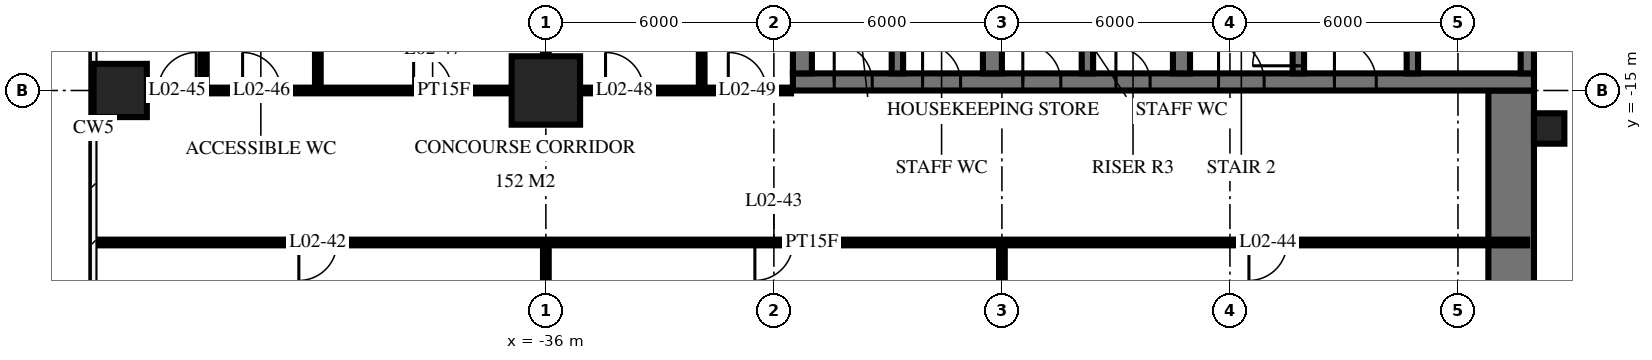
"""IFC4 building model, lengths in metres.
Left out: names, types, materials, properties, quantities, classifications, styles, units other than length and angle.
Written with IfcOpenShell. Run it as: python <this file> out.ifc"""

import sys

from ifc_helpers import new_model, si_unit, direction, frame, frame_2d, origin, origin_2d, place, context, subcontext, project, spatial, rectangle, circle, extrude, element, fill, save


model = new_model("IFC4")
c1 = context("Model", 3, precision=1e-05, world=origin(), true_north=direction((0.0, 1.0)))
c2 = subcontext(c1, "Body", "Model", "MODEL_VIEW")
j1 = project(units=[si_unit("LENGTHUNIT", "METRE"), si_unit("PLANEANGLEUNIT", "RADIAN")], contexts=[c1])
p1 = place(None, origin())
s1 = spatial("IfcSite", under=j1, at=p1, CompositionType="ELEMENT")
p2 = place(p1, origin())
s2 = spatial("IfcBuilding", under=s1, at=p2, CompositionType="ELEMENT")
p3 = place(p2, frame((0.0, 0.0, 12.5)))
s3 = spatial("IfcBuildingStorey", under=s2, at=p3, CompositionType="ELEMENT", Elevation=12.5)
p4 = place(p3, frame((-47.2, -15.0, 0.0), z_axis=(0.0, 0.0, 1.0), x_axis=(1.0, 0.0, 0.0)))
e1 = element("IfcColumn", 1, at=p4, inside=s3, PredefinedType="COLUMN", context=c2, shape_type="SweptSolid", body=[
    extrude(circle(Radius=0.7, at=origin_2d()), origin(), (0.0, 0.0, 1.0), 5.5),
])
p5 = place(p3, frame((-36.0, -15.0, 0.0), z_axis=(0.0, 0.0, 1.0), x_axis=(1.0, 0.0, 0.0)))
e2 = element("IfcColumn", 2, at=p5, inside=s3, PredefinedType="COLUMN", context=c2, shape_type="SweptSolid", body=[
    extrude(circle(Radius=0.9, at=origin_2d()), origin(), (0.0, 0.0, 1.0), 5.5),
])
p6 = place(p3, frame((-29.5, -14.775, 0.0), z_axis=(0.0, 0.0, 1.0), x_axis=(1.0, 0.0, 0.0)))
e3 = element("IfcWall", 3, at=p6, inside=s3, PredefinedType="SHEAR", context=c2, shape_type="SweptSolid", body=[
    extrude(rectangle(XDim=19.5, YDim=0.45, at=frame_2d((9.75, 0.0))), origin(), (0.0, 0.0, 1.0), 5.5),
])
p7 = place(p6, frame((11.2, 0.0, 0.0)))
e4 = element("IfcOpeningElement", 4, at=p7, cuts=e3, PredefinedType="OPENING", context=c2, shape_type="SweptSolid", body=[
    extrude(rectangle(XDim=1.2, YDim=2.1, at=frame_2d((0.6, 1.05))), frame((0.0, 0.235, 0.0), z_axis=(0.0, -1.0, 0.0), x_axis=(1.0, 0.0, 0.0)), (0.0, 0.0, 1.0), 0.47),
])
p8 = place(p6, frame((14.25, 0.0, 0.0)))
e5 = element("IfcOpeningElement", 5, at=p8, cuts=e3, PredefinedType="OPENING", context=c2, shape_type="SweptSolid", body=[
    extrude(rectangle(XDim=1.1, YDim=2.1, at=frame_2d((0.55, 1.05))), frame((0.0, 0.235, 0.0), z_axis=(0.0, -1.0, 0.0), x_axis=(1.0, 0.0, 0.0)), (0.0, 0.0, 1.0), 0.47),
])
p9 = place(p6, frame((8.5, 0.0, 0.0)))
e6 = element("IfcOpeningElement", 6, at=p9, cuts=e3, PredefinedType="OPENING", context=c2, shape_type="SweptSolid", body=[
    extrude(rectangle(XDim=0.9, YDim=2.1, at=frame_2d((0.45, 1.05))), frame((0.0, 0.235, 0.0), z_axis=(0.0, -1.0, 0.0), x_axis=(1.0, 0.0, 0.0)), (0.0, 0.0, 1.0), 0.47),
])
p10 = place(p6, frame((6.05, 0.0, 0.0)))
e7 = element("IfcOpeningElement", 7, at=p10, cuts=e3, PredefinedType="OPENING", context=c2, shape_type="SweptSolid", body=[
    extrude(rectangle(XDim=1.0, YDim=2.1, at=frame_2d((0.5, 1.05))), frame((0.0, 0.235, 0.0), z_axis=(0.0, -1.0, 0.0), x_axis=(1.0, 0.0, 0.0)), (0.0, 0.0, 1.0), 0.47),
])
p11 = place(p6, frame((3.413, 0.0, 0.0)))
e8 = element("IfcOpeningElement", 8, at=p11, cuts=e3, PredefinedType="OPENING", context=c2, shape_type="SweptSolid", body=[
    extrude(rectangle(XDim=1.0, YDim=2.1, at=frame_2d((0.5, 1.05))), frame((0.0, 0.235, 0.0), z_axis=(0.0, -1.0, 0.0), x_axis=(1.0, 0.0, 0.0)), (0.0, 0.0, 1.0), 0.47),
])
p12 = place(p6, frame((1.087, 0.0, 0.0)))
e9 = element("IfcOpeningElement", 9, at=p12, cuts=e3, PredefinedType="OPENING", context=c2, shape_type="SweptSolid", body=[
    extrude(rectangle(XDim=1.0, YDim=2.1, at=frame_2d((0.5, 1.05))), frame((0.0, 0.235, 0.0), z_axis=(0.0, -1.0, 0.0), x_axis=(1.0, 0.0, 0.0)), (0.0, 0.0, 1.0), 0.47),
])
p13 = place(p3, frame((-10.175, -14.55, 0.0), z_axis=(0.0, 0.0, 1.0), x_axis=(0.0, 1.0, 0.0)))
e10 = element("IfcWall", 10, at=p13, inside=s3, PredefinedType="SHEAR", context=c2, shape_type="SweptSolid", body=[
    extrude(rectangle(XDim=14.1, YDim=0.35, at=frame_2d((7.05, 0.0))), origin(), (0.0, 0.0, 1.0), 5.5),
])
p14 = place(p3, frame((-29.25, -14.55, 0.0), z_axis=(0.0, 0.0, 1.0), x_axis=(0.0, 1.0, 0.0)))
e11 = element("IfcWall", 11, at=p14, inside=s3, PredefinedType="SHEAR", context=c2, shape_type="SweptSolid", body=[
    extrude(rectangle(XDim=14.1, YDim=0.5, at=frame_2d((7.05, 0.0))), origin(), (0.0, 0.0, 1.0), 5.5),
])
p15 = place(p14, frame((8.4, 0.0, 0.0)))
e12 = element("IfcOpeningElement", 12, at=p15, cuts=e11, PredefinedType="OPENING", context=c2, shape_type="SweptSolid", body=[
    extrude(rectangle(XDim=1.4, YDim=2.4, at=frame_2d((0.7, 1.2))), frame((0.0, 0.26, 0.0), z_axis=(0.0, -1.0, 0.0), x_axis=(1.0, 0.0, 0.0)), (0.0, 0.0, 1.0), 0.52),
])
p16 = place(p14, frame((10.0, 0.0, 0.0)))
e13 = element("IfcOpeningElement", 13, at=p16, cuts=e11, PredefinedType="OPENING", context=c2, shape_type="SweptSolid", body=[
    extrude(rectangle(XDim=1.4, YDim=2.4, at=frame_2d((0.7, 1.2))), frame((0.0, 0.26, 0.0), z_axis=(0.0, -1.0, 0.0), x_axis=(1.0, 0.0, 0.0)), (0.0, 0.0, 1.0), 0.52),
])
p17 = place(p3, frame((-13.2, -14.55, 0.0), z_axis=(0.0, 0.0, 1.0), x_axis=(0.0, 1.0, 0.0)))
e14 = element("IfcWall", 14, at=p17, inside=s3, PredefinedType="SHEAR", context=c2, shape_type="SweptSolid", body=[
    extrude(rectangle(XDim=5.4, YDim=0.3, at=frame_2d((2.7, 0.0))), origin(), (0.0, 0.0, 1.0), 5.5),
])
p18 = place(p17, frame((4.0, 0.0, 0.0)))
e15 = element("IfcOpeningElement", 15, at=p18, cuts=e14, PredefinedType="OPENING", context=c2, shape_type="SweptSolid", body=[
    extrude(rectangle(XDim=1.2, YDim=2.1, at=frame_2d((0.6, 1.05))), frame((0.0, 0.16, 0.0), z_axis=(0.0, -1.0, 0.0), x_axis=(1.0, 0.0, 0.0)), (0.0, 0.0, 1.0), 0.32),
])
p19 = place(p3, frame((-16.2, -14.55, 0.0), z_axis=(0.0, 0.0, 1.0), x_axis=(0.0, 1.0, 0.0)))
e16 = element("IfcWall", 16, at=p19, inside=s3, PredefinedType="SHEAR", context=c2, shape_type="SweptSolid", body=[
    extrude(rectangle(XDim=5.4, YDim=0.3, at=frame_2d((2.7, 0.0))), origin(), (0.0, 0.0, 1.0), 5.5),
])
p20 = place(p19, frame((0.2, 0.0, 0.0)))
e17 = element("IfcOpeningElement", 17, at=p20, cuts=e16, PredefinedType="OPENING", context=c2, shape_type="SweptSolid", body=[
    extrude(rectangle(XDim=1.2, YDim=2.1, at=frame_2d((0.6, 1.05))), frame((0.0, 0.16, 0.0), z_axis=(0.0, -1.0, 0.0), x_axis=(1.0, 0.0, 0.0)), (0.0, 0.0, 1.0), 0.32),
])
p21 = place(p3, frame((-19.275, -14.55, 0.0), z_axis=(0.0, 0.0, 1.0), x_axis=(0.0, 1.0, 0.0)))
e18 = element("IfcWall", 18, at=p21, inside=s3, PredefinedType="SHEAR", context=c2, shape_type="SweptSolid", body=[
    extrude(rectangle(XDim=5.4, YDim=0.45, at=frame_2d((2.7, 0.0))), origin(), (0.0, 0.0, 1.0), 5.5),
])
p22 = place(p3, frame((-21.75, -14.55, 0.0), z_axis=(0.0, 0.0, 1.0), x_axis=(0.0, 1.0, 0.0)))
e19 = element("IfcWall", 19, at=p22, inside=s3, PredefinedType="SHEAR", context=c2, shape_type="SweptSolid", body=[
    extrude(rectangle(XDim=5.4, YDim=0.3, at=frame_2d((2.7, 0.0))), origin(), (0.0, 0.0, 1.0), 5.5),
])
p23 = place(p3, frame((-24.25, -14.55, 0.0), z_axis=(0.0, 0.0, 1.0), x_axis=(0.0, 1.0, 0.0)))
e20 = element("IfcWall", 20, at=p23, inside=s3, PredefinedType="SHEAR", context=c2, shape_type="SweptSolid", body=[
    extrude(rectangle(XDim=5.4, YDim=0.5, at=frame_2d((2.7, 0.0))), origin(), (0.0, 0.0, 1.0), 5.5),
])
p24 = place(p3, frame((-26.75, -14.55, 0.0), z_axis=(0.0, 0.0, 1.0), x_axis=(0.0, 1.0, 0.0)))
e21 = element("IfcWall", 21, at=p24, inside=s3, PredefinedType="SHEAR", context=c2, shape_type="SweptSolid", body=[
    extrude(rectangle(XDim=5.4, YDim=0.3, at=frame_2d((2.7, 0.0))), origin(), (0.0, 0.0, 1.0), 5.5),
])
p25 = place(p3, frame((-10.6, -40.0, 0.0), z_axis=(0.0, 0.0, 1.0), x_axis=(0.0, 1.0, 0.0)))
e22 = element("IfcWall", 22, at=p25, inside=s3, PredefinedType="SHEAR", context=c2, shape_type="SweptSolid", body=[
    extrude(rectangle(XDim=25.0, YDim=1.2, at=frame_2d((12.5, 0.0))), origin(), (0.0, 0.0, 1.0), 5.5),
])
p26 = place(p3, frame((-9.6, -16.0, 0.0), z_axis=(0.0, 0.0, 1.0), x_axis=(1.0, 0.0, 0.0)))
e23 = element("IfcColumn", 23, at=p26, inside=s3, PredefinedType="COLUMN", context=c2, shape_type="SweptSolid", body=[
    extrude(rectangle(XDim=0.8, YDim=0.8, at=origin_2d()), origin(), (0.0, 0.0, 1.0), 4.25),
])
p27 = place(p3, frame((-24.0, -39.82, 0.0), z_axis=(0.0, 0.0, 1.0), x_axis=(0.0, 1.0, 0.0)))
e24 = element("IfcWall", 24, at=p27, inside=s3, PredefinedType="PARTITIONING", context=c2, shape_type="SweptSolid", body=[
    extrude(rectangle(XDim=20.82, YDim=0.15, at=frame_2d((10.41, 0.0))), origin(), (0.0, 0.0, 1.0), 5.05),
])
p28 = place(p3, frame((-31.9, -15.0, 0.0), z_axis=(0.0, 0.0, 1.0), x_axis=(0.0, 1.0, 0.0)))
e25 = element("IfcWall", 25, at=p28, inside=s3, PredefinedType="PARTITIONING", context=c2, shape_type="SweptSolid", body=[
    extrude(rectangle(XDim=12.5, YDim=0.15, at=frame_2d((6.25, 0.0))), origin(), (0.0, 0.0, 1.0), 5.05),
])
p29 = place(p3, frame((-36.0, -39.82, 0.0), z_axis=(0.0, 0.0, 1.0), x_axis=(0.0, 1.0, 0.0)))
e26 = element("IfcWall", 26, at=p29, inside=s3, PredefinedType="PARTITIONING", context=c2, shape_type="SweptSolid", body=[
    extrude(rectangle(XDim=20.82, YDim=0.15, at=frame_2d((10.41, 0.0))), origin(), (0.0, 0.0, 1.0), 5.05),
])
p30 = place(p3, frame((-36.0, -15.0, 0.0), z_axis=(0.0, 0.0, 1.0), x_axis=(0.0, 1.0, 0.0)))
e27 = element("IfcWall", 27, at=p30, inside=s3, PredefinedType="PARTITIONING", context=c2, shape_type="SweptSolid", body=[
    extrude(rectangle(XDim=22.82, YDim=0.15, at=frame_2d((11.41, 0.0))), origin(), (0.0, 0.0, 1.0), 5.05),
])
p31 = place(p3, frame((-42.0, -15.0, 0.0), z_axis=(0.0, 0.0, 1.0), x_axis=(0.0, 1.0, 0.0)))
e28 = element("IfcWall", 28, at=p31, inside=s3, PredefinedType="PLUMBINGWALL", context=c2, shape_type="SweptSolid", body=[
    extrude(rectangle(XDim=4.5, YDim=0.15, at=frame_2d((2.25, 0.0))), origin(), (0.0, 0.0, 1.0), 5.05),
])
p32 = place(p3, frame((-45.0, -15.0, 0.0), z_axis=(0.0, 0.0, 1.0), x_axis=(0.0, 1.0, 0.0)))
e29 = element("IfcWall", 29, at=p32, inside=s3, PredefinedType="PLUMBINGWALL", context=c2, shape_type="SweptSolid", body=[
    extrude(rectangle(XDim=6.0, YDim=0.15, at=frame_2d((3.0, 0.0))), origin(), (0.0, 0.0, 1.0), 5.05),
])
p33 = place(p3, frame((-47.82, -19.0, 0.0), z_axis=(0.0, 0.0, 1.0), x_axis=(1.0, 0.0, 0.0)))
e30 = element("IfcWall", 30, at=p33, inside=s3, PredefinedType="PARTITIONING", context=c2, shape_type="SweptSolid", body=[
    extrude(rectangle(XDim=37.64, YDim=0.15, at=frame_2d((18.82, 0.0))), origin(), (0.0, 0.0, 1.0), 5.05),
])
p34 = place(p33, frame((5.32, 0.0, 0.0)))
e31 = element("IfcOpeningElement", 31, at=p34, cuts=e30, PredefinedType="OPENING", context=c2, shape_type="SweptSolid", body=[
    extrude(rectangle(XDim=1.0, YDim=2.1, at=frame_2d((0.5, 1.05))), frame((0.0, 0.085, 0.0), z_axis=(0.0, -1.0, 0.0), x_axis=(1.0, 0.0, 0.0)), (0.0, 0.0, 1.0), 0.17),
])
p35 = place(p33, frame((17.32, 0.0, 0.0)))
e32 = element("IfcOpeningElement", 32, at=p35, cuts=e30, PredefinedType="OPENING", context=c2, shape_type="SweptSolid", body=[
    extrude(rectangle(XDim=1.0, YDim=2.1, at=frame_2d((0.5, 1.05))), frame((0.0, 0.085, 0.0), z_axis=(0.0, -1.0, 0.0), x_axis=(1.0, 0.0, 0.0)), (0.0, 0.0, 1.0), 0.17),
])
p36 = place(p33, frame((30.32, 0.0, 0.0)))
e33 = element("IfcOpeningElement", 33, at=p36, cuts=e30, PredefinedType="OPENING", context=c2, shape_type="SweptSolid", body=[
    extrude(rectangle(XDim=1.0, YDim=2.1, at=frame_2d((0.5, 1.05))), frame((0.0, 0.085, 0.0), z_axis=(0.0, -1.0, 0.0), x_axis=(1.0, 0.0, 0.0)), (0.0, 0.0, 1.0), 0.17),
])
p37 = place(p3, frame((-47.82, -15.0, 0.0), z_axis=(0.0, 0.0, 1.0), x_axis=(1.0, 0.0, 0.0)))
e34 = element("IfcWall", 34, at=p37, inside=s3, PredefinedType="PARTITIONING", context=c2, shape_type="SweptSolid", body=[
    extrude(rectangle(XDim=18.27, YDim=0.15, at=frame_2d((9.135, 0.0))), origin(), (0.0, 0.0, 1.0), 5.05),
])
p38 = place(p37, frame((1.62, 0.0, 0.0)))
e35 = element("IfcOpeningElement", 35, at=p38, cuts=e34, PredefinedType="OPENING", context=c2, shape_type="SweptSolid", body=[
    extrude(rectangle(XDim=1.0, YDim=2.1, at=frame_2d((0.5, 1.05))), frame((0.0, 0.085, 0.0), z_axis=(0.0, -1.0, 0.0), x_axis=(1.0, 0.0, 0.0)), (0.0, 0.0, 1.0), 0.17),
])
p39 = place(p37, frame((3.84, 0.0, 0.0)))
e36 = element("IfcOpeningElement", 36, at=p39, cuts=e34, PredefinedType="OPENING", context=c2, shape_type="SweptSolid", body=[
    extrude(rectangle(XDim=1.0, YDim=2.1, at=frame_2d((0.5, 1.05))), frame((0.0, 0.085, 0.0), z_axis=(0.0, -1.0, 0.0), x_axis=(1.0, 0.0, 0.0)), (0.0, 0.0, 1.0), 0.17),
])
p40 = place(p37, frame((8.34, 0.0, 0.0)))
e37 = element("IfcOpeningElement", 37, at=p40, cuts=e34, PredefinedType="OPENING", context=c2, shape_type="SweptSolid", body=[
    extrude(rectangle(XDim=1.0, YDim=2.1, at=frame_2d((0.5, 1.05))), frame((0.0, 0.085, 0.0), z_axis=(0.0, -1.0, 0.0), x_axis=(1.0, 0.0, 0.0)), (0.0, 0.0, 1.0), 0.17),
])
p41 = place(p37, frame((13.39, 0.0, 0.0)))
e38 = element("IfcOpeningElement", 38, at=p41, cuts=e34, PredefinedType="OPENING", context=c2, shape_type="SweptSolid", body=[
    extrude(rectangle(XDim=1.0, YDim=2.1, at=frame_2d((0.5, 1.05))), frame((0.0, 0.085, 0.0), z_axis=(0.0, -1.0, 0.0), x_axis=(1.0, 0.0, 0.0)), (0.0, 0.0, 1.0), 0.17),
])
p42 = place(p37, frame((16.62, 0.0, 0.0)))
e39 = element("IfcOpeningElement", 39, at=p42, cuts=e34, PredefinedType="OPENING", context=c2, shape_type="SweptSolid", body=[
    extrude(rectangle(XDim=1.0, YDim=2.1, at=frame_2d((0.5, 1.05))), frame((0.0, 0.085, 0.0), z_axis=(0.0, -1.0, 0.0), x_axis=(1.0, 0.0, 0.0)), (0.0, 0.0, 1.0), 0.17),
])
p43 = place(p7, origin())
e40 = element("IfcDoor", 40, at=p43, inside=s3, OperationType="SINGLE_SWING_RIGHT", PredefinedType="DOOR", context=c2, shape_type="SweptSolid", body=[
    extrude(rectangle(XDim=1.2, YDim=2.1, at=frame_2d((0.6, 1.05))), frame((0.0, 0.025, 0.0), z_axis=(0.0, -1.0, 0.0), x_axis=(1.0, 0.0, 0.0)), (0.0, 0.0, 1.0), 0.05),
])
fill(e4, e40)
p44 = place(p8, origin())
e41 = element("IfcDoor", 41, at=p44, inside=s3, OperationType="SINGLE_SWING_RIGHT", PredefinedType="DOOR", context=c2, shape_type="SweptSolid", body=[
    extrude(rectangle(XDim=1.1, YDim=2.1, at=frame_2d((0.55, 1.05))), frame((0.0, 0.025, 0.0), z_axis=(0.0, -1.0, 0.0), x_axis=(1.0, 0.0, 0.0)), (0.0, 0.0, 1.0), 0.05),
])
fill(e5, e41)
p45 = place(p9, origin())
e42 = element("IfcDoor", 42, at=p45, inside=s3, OperationType="SINGLE_SWING_RIGHT", PredefinedType="DOOR", context=c2, shape_type="SweptSolid", body=[
    extrude(rectangle(XDim=0.9, YDim=2.1, at=frame_2d((0.45, 1.05))), frame((0.0, 0.025, 0.0), z_axis=(0.0, -1.0, 0.0), x_axis=(1.0, 0.0, 0.0)), (0.0, 0.0, 1.0), 0.05),
])
fill(e6, e42)
p46 = place(p10, origin())
e43 = element("IfcDoor", 43, at=p46, inside=s3, OperationType="SINGLE_SWING_RIGHT", PredefinedType="DOOR", context=c2, shape_type="SweptSolid", body=[
    extrude(rectangle(XDim=1.0, YDim=2.1, at=frame_2d((0.5, 1.05))), frame((0.0, 0.025, 0.0), z_axis=(0.0, -1.0, 0.0), x_axis=(1.0, 0.0, 0.0)), (0.0, 0.0, 1.0), 0.05),
])
fill(e7, e43)
p47 = place(p11, origin())
e44 = element("IfcDoor", 44, at=p47, inside=s3, OperationType="SINGLE_SWING_RIGHT", PredefinedType="DOOR", context=c2, shape_type="SweptSolid", body=[
    extrude(rectangle(XDim=1.0, YDim=2.1, at=frame_2d((0.5, 1.05))), frame((0.0, 0.025, 0.0), z_axis=(0.0, -1.0, 0.0), x_axis=(1.0, 0.0, 0.0)), (0.0, 0.0, 1.0), 0.05),
])
fill(e8, e44)
p48 = place(p12, origin())
e45 = element("IfcDoor", 45, at=p48, inside=s3, OperationType="SINGLE_SWING_RIGHT", PredefinedType="DOOR", context=c2, shape_type="SweptSolid", body=[
    extrude(rectangle(XDim=1.0, YDim=2.1, at=frame_2d((0.5, 1.05))), frame((0.0, 0.025, 0.0), z_axis=(0.0, -1.0, 0.0), x_axis=(1.0, 0.0, 0.0)), (0.0, 0.0, 1.0), 0.05),
])
fill(e9, e45)
p49 = place(p20, origin())
e46 = element("IfcDoor", 46, at=p49, inside=s3, OperationType="SINGLE_SWING_RIGHT", PredefinedType="DOOR", context=c2, shape_type="SweptSolid", body=[
    extrude(rectangle(XDim=1.2, YDim=2.1, at=frame_2d((0.6, 1.05))), frame((0.0, 0.025, 0.0), z_axis=(0.0, -1.0, 0.0), x_axis=(1.0, 0.0, 0.0)), (0.0, 0.0, 1.0), 0.05),
])
fill(e17, e46)
p50 = place(p34, frame((0.5, 0.0, 0.0), z_axis=(0.0, 0.0, 1.0), x_axis=(-1.0, 0.0, 0.0)))
e47 = element("IfcDoor", 47, at=p50, inside=s3, OperationType="SINGLE_SWING_LEFT", PredefinedType="DOOR", context=c2, shape_type="SweptSolid", body=[
    extrude(rectangle(XDim=1.0, YDim=2.1, at=frame_2d((0.0, 1.05))), frame((0.0, -0.025, 0.0), z_axis=(0.0, 1.0, 0.0), x_axis=(-1.0, 0.0, 0.0)), (0.0, 0.0, 1.0), 0.05),
])
fill(e31, e47)
p51 = place(p35, frame((0.5, 0.0, 0.0), z_axis=(0.0, 0.0, 1.0), x_axis=(-1.0, 0.0, 0.0)))
e48 = element("IfcDoor", 48, at=p51, inside=s3, OperationType="SINGLE_SWING_LEFT", PredefinedType="DOOR", context=c2, shape_type="SweptSolid", body=[
    extrude(rectangle(XDim=1.0, YDim=2.1, at=frame_2d((0.0, 1.05))), frame((0.0, -0.025, 0.0), z_axis=(0.0, 1.0, 0.0), x_axis=(-1.0, 0.0, 0.0)), (0.0, 0.0, 1.0), 0.05),
])
fill(e32, e48)
p52 = place(p36, frame((0.5, 0.0, 0.0), z_axis=(0.0, 0.0, 1.0), x_axis=(-1.0, 0.0, 0.0)))
e49 = element("IfcDoor", 49, at=p52, inside=s3, OperationType="SINGLE_SWING_LEFT", PredefinedType="DOOR", context=c2, shape_type="SweptSolid", body=[
    extrude(rectangle(XDim=1.0, YDim=2.1, at=frame_2d((0.0, 1.05))), frame((0.0, -0.025, 0.0), z_axis=(0.0, 1.0, 0.0), x_axis=(-1.0, 0.0, 0.0)), (0.0, 0.0, 1.0), 0.05),
])
fill(e33, e49)
p53 = place(p38, origin())
e50 = element("IfcDoor", 50, at=p53, inside=s3, OperationType="SINGLE_SWING_LEFT", PredefinedType="DOOR", context=c2, shape_type="SweptSolid", body=[
    extrude(rectangle(XDim=1.0, YDim=2.1, at=frame_2d((0.5, 1.05))), frame((0.0, 0.025, 0.0), z_axis=(0.0, -1.0, 0.0), x_axis=(1.0, 0.0, 0.0)), (0.0, 0.0, 1.0), 0.05),
])
fill(e35, e50)
p54 = place(p39, origin())
e51 = element("IfcDoor", 51, at=p54, inside=s3, OperationType="SINGLE_SWING_RIGHT", PredefinedType="DOOR", context=c2, shape_type="SweptSolid", body=[
    extrude(rectangle(XDim=1.0, YDim=2.1, at=frame_2d((0.5, 1.05))), frame((0.0, 0.025, 0.0), z_axis=(0.0, -1.0, 0.0), x_axis=(1.0, 0.0, 0.0)), (0.0, 0.0, 1.0), 0.05),
])
fill(e36, e51)
p55 = place(p40, origin())
e52 = element("IfcDoor", 52, at=p55, inside=s3, OperationType="SINGLE_SWING_RIGHT", PredefinedType="DOOR", context=c2, shape_type="SweptSolid", body=[
    extrude(rectangle(XDim=1.0, YDim=2.1, at=frame_2d((0.5, 1.05))), frame((0.0, 0.025, 0.0), z_axis=(0.0, -1.0, 0.0), x_axis=(1.0, 0.0, 0.0)), (0.0, 0.0, 1.0), 0.05),
])
fill(e37, e52)
p56 = place(p41, origin())
e53 = element("IfcDoor", 53, at=p56, inside=s3, OperationType="SINGLE_SWING_RIGHT", PredefinedType="DOOR", context=c2, shape_type="SweptSolid", body=[
    extrude(rectangle(XDim=1.0, YDim=2.1, at=frame_2d((0.5, 1.05))), frame((0.0, 0.025, 0.0), z_axis=(0.0, -1.0, 0.0), x_axis=(1.0, 0.0, 0.0)), (0.0, 0.0, 1.0), 0.05),
])
fill(e38, e53)
p57 = place(p42, origin())
e54 = element("IfcDoor", 54, at=p57, inside=s3, OperationType="SINGLE_SWING_RIGHT", PredefinedType="DOOR", context=c2, shape_type="SweptSolid", body=[
    extrude(rectangle(XDim=1.0, YDim=2.1, at=frame_2d((0.5, 1.05))), frame((0.0, 0.025, 0.0), z_axis=(0.0, -1.0, 0.0), x_axis=(1.0, 0.0, 0.0)), (0.0, 0.0, 1.0), 0.05),
])
fill(e39, e54)
save(model, sys.argv[1])
